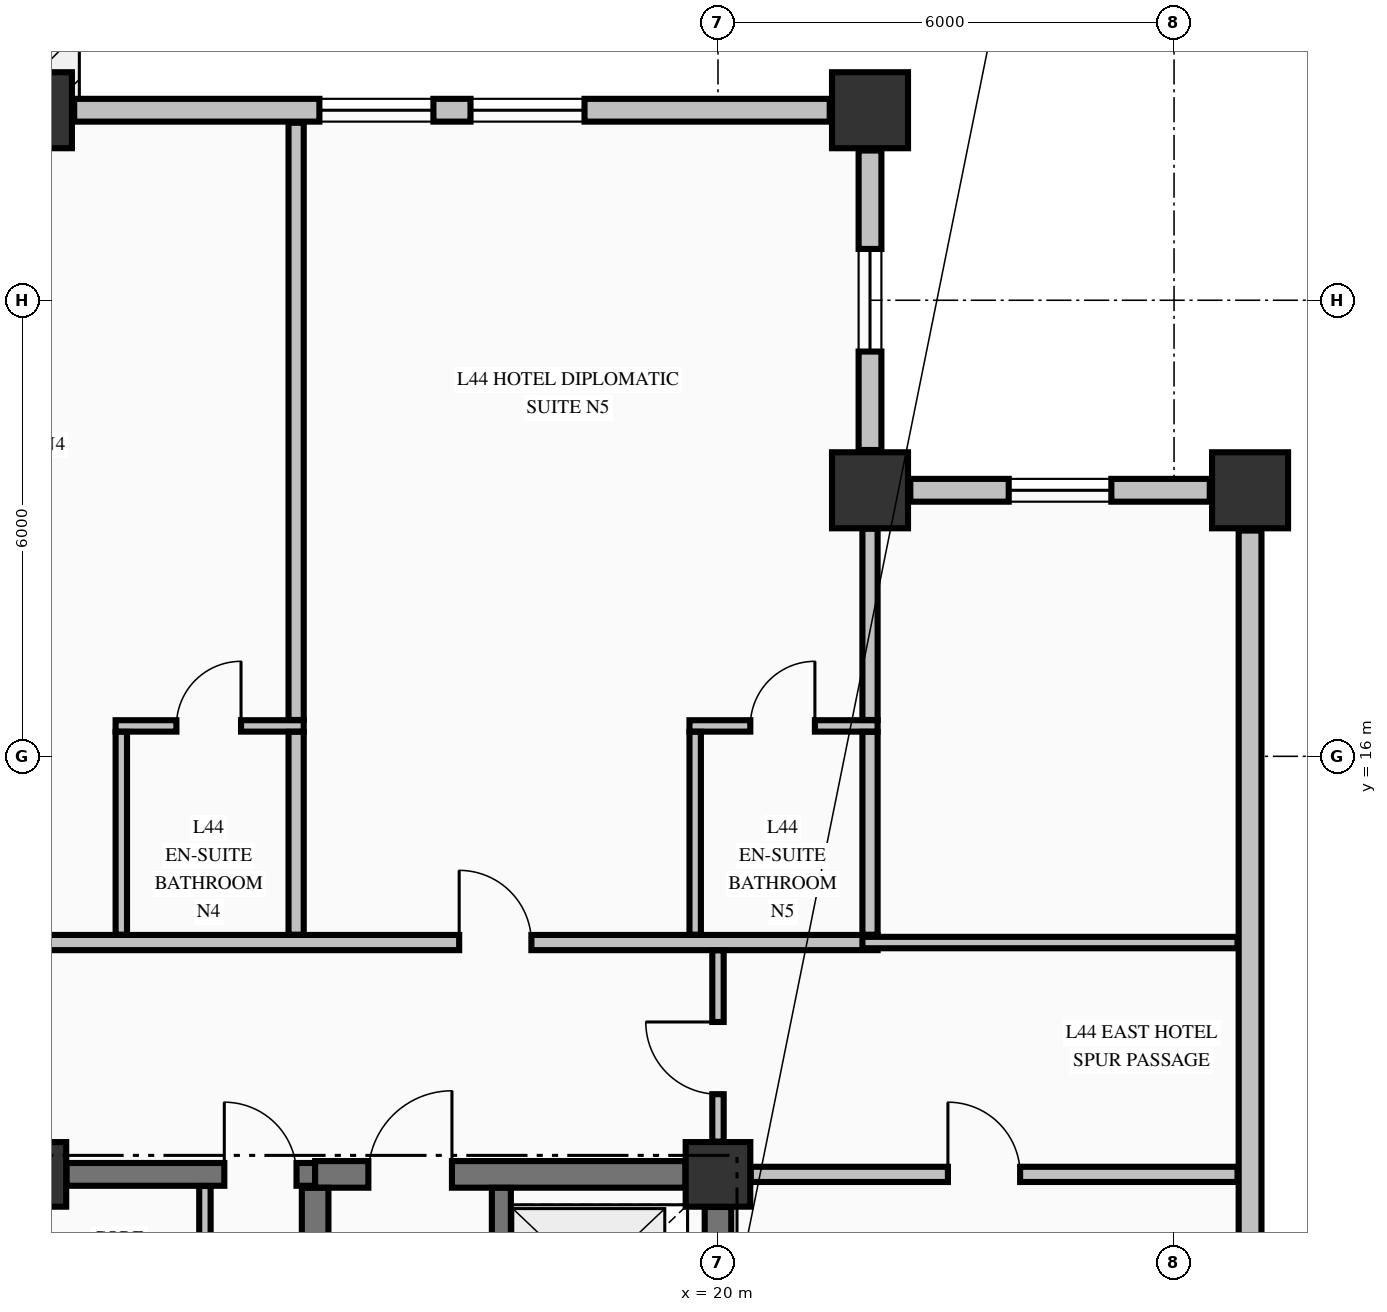
"""IFC4 building model, lengths in metres.
Left out: names, types, materials, properties, quantities, classifications, styles, units other than length and angle.
Written with IfcOpenShell. Run it as: python <this file> out.ifc"""

import sys

from ifc_helpers import new_model, si_unit, direction, frame, frame_2d, origin, origin_2d, place, context, subcontext, project, spatial, rectangle, extrude, element, fill, save


model = new_model("IFC4")
c1 = context("Model", 3, precision=1e-05, world=origin(), true_north=direction((0.0, 1.0)))
c2 = subcontext(c1, "Body", "Model", "MODEL_VIEW")
j1 = project(units=[si_unit("LENGTHUNIT", "METRE"), si_unit("PLANEANGLEUNIT", "RADIAN")], contexts=[c1])
p1 = place(None, origin())
s1 = spatial("IfcSite", under=j1, at=p1, CompositionType="ELEMENT")
p2 = place(p1, origin())
s2 = spatial("IfcBuilding", under=s1, at=p2, CompositionType="ELEMENT")
p3 = place(p2, frame((0.0, 0.0, 172.86)))
s3 = spatial("IfcBuildingStorey", under=s2, at=p3, CompositionType="ELEMENT", Elevation=172.86)
for number, where, z_axis, x_axis in (
    (1, (11.0, 24.5, -0.25), (0.0, 0.0, 1.0), (1.0, 0.0, 0.0)),
    (2, (22.0, 24.5, -0.25), (0.0, 0.0, 1.0), (1.0, 0.0, 0.0)),
    (3, (27.0, 19.5, -0.25), (0.0, 0.0, 1.0), (1.0, 0.0, 0.0)),
    (4, (22.0, 19.5, -0.25), (0.0, 0.0, 1.0), (1.0, 0.0, 0.0)),
):
    element("IfcColumn", number, at=place(p3, frame(where, z_axis=z_axis, x_axis=x_axis)), inside=s3, PredefinedType="COLUMN", context=c2, shape_type="SweptSolid", body=[
        extrude(rectangle(XDim=1.0, YDim=1.0, at=origin_2d()), origin(), (0.0, 0.0, 1.0), 3.375),
    ])
for number, where, z_axis, x_axis in (
    (5, (11.0, 10.5, -0.25), (0.0, 0.0, 1.0), (1.0, 0.0, 0.0)),
    (6, (20.0, 10.5, -0.25), (0.0, 0.0, 1.0), (1.0, 0.0, 0.0)),
):
    element("IfcColumn", number, at=place(p3, frame(where, z_axis=z_axis, x_axis=x_axis)), inside=s3, PredefinedType="COLUMN", context=c2, shape_type="SweptSolid", body=[
        extrude(rectangle(XDim=0.85, YDim=0.85, at=origin_2d()), origin(), (0.0, 0.0, 1.0), 3.375),
    ])
p4 = place(p3, frame((26.47, 19.5, 0.0), z_axis=(0.0, 0.0, 1.0), x_axis=(-1.0, 0.0, 0.0)))
e7 = element("IfcWall", 7, at=p4, inside=s3, PredefinedType="STANDARD", context=c2, shape_type="SweptSolid", body=[
    extrude(rectangle(XDim=3.94, YDim=0.3, at=frame_2d((1.97, 0.0))), origin(), (0.0, 0.0, 1.0), 2.517),
])
p5 = place(p4, frame((1.295, 0.0, 0.68)))
e8 = element("IfcOpeningElement", 8, at=p5, cuts=e7, PredefinedType="OPENING", context=c2, shape_type="SweptSolid", body=[
    extrude(rectangle(XDim=1.35, YDim=1.42, at=frame_2d((0.675, 0.71))), frame((0.0, 0.16, 0.0), z_axis=(0.0, -1.0, 0.0), x_axis=(1.0, 0.0, 0.0)), (0.0, 0.0, 1.0), 0.32),
])
p6 = place(p3, frame((22.0, 20.03, 0.0), z_axis=(0.0, 0.0, 1.0), x_axis=(0.0, 1.0, 0.0)))
e9 = element("IfcWall", 9, at=p6, inside=s3, PredefinedType="STANDARD", context=c2, shape_type="SweptSolid", body=[
    extrude(rectangle(XDim=3.94, YDim=0.3, at=frame_2d((1.97, 0.0))), origin(), (0.0, 0.0, 1.0), 2.517),
])
p7 = place(p6, frame((1.295, 0.0, 0.68)))
e10 = element("IfcOpeningElement", 10, at=p7, cuts=e9, PredefinedType="OPENING", context=c2, shape_type="SweptSolid", body=[
    extrude(rectangle(XDim=1.35, YDim=1.42, at=frame_2d((0.675, 0.71))), frame((0.0, 0.16, 0.0), z_axis=(0.0, -1.0, 0.0), x_axis=(1.0, 0.0, 0.0)), (0.0, 0.0, 1.0), 0.32),
])
p8 = place(p3, frame((21.47, 24.5, 0.0), z_axis=(0.0, 0.0, 1.0), x_axis=(-1.0, 0.0, 0.0)))
e11 = element("IfcWall", 11, at=p8, inside=s3, PredefinedType="STANDARD", context=c2, shape_type="SweptSolid", body=[
    extrude(rectangle(XDim=9.94, YDim=0.3, at=frame_2d((4.97, 0.0))), origin(), (0.0, 0.0, 1.0), 2.517),
])
p9 = place(p8, frame((3.226, 0.0, 0.72)))
e12 = element("IfcOpeningElement", 12, at=p9, cuts=e11, PredefinedType="OPENING", context=c2, shape_type="SweptSolid", body=[
    extrude(rectangle(XDim=1.5, YDim=1.6, at=frame_2d((0.75, 0.8))), frame((0.0, 0.16, 0.0), z_axis=(0.0, -1.0, 0.0), x_axis=(1.0, 0.0, 0.0)), (0.0, 0.0, 1.0), 0.32),
])
p10 = place(p8, frame((5.214, 0.0, 0.72)))
e13 = element("IfcOpeningElement", 13, at=p10, cuts=e11, PredefinedType="OPENING", context=c2, shape_type="SweptSolid", body=[
    extrude(rectangle(XDim=1.5, YDim=1.6, at=frame_2d((0.75, 0.8))), frame((0.0, 0.16, 0.0), z_axis=(0.0, -1.0, 0.0), x_axis=(1.0, 0.0, 0.0)), (0.0, 0.0, 1.0), 0.32),
])
p11 = place(p3, frame((27.0, 9.53, 0.0), z_axis=(0.0, 0.0, 1.0), x_axis=(0.0, 1.0, 0.0)))
e14 = element("IfcWall", 14, at=p11, inside=s3, PredefinedType="STANDARD", context=c2, shape_type="SweptSolid", body=[
    extrude(rectangle(XDim=9.44, YDim=0.3, at=frame_2d((4.72, 0.0))), origin(), (0.0, 0.0, 1.0), 2.517),
])
p12 = place(p3, frame((11.429, 10.5, 0.0), z_axis=(0.0, 0.0, 1.0), x_axis=(1.0, 0.0, 0.0)))
e15 = element("IfcWall", 15, at=p12, inside=s3, PredefinedType="SHEAR", context=c2, shape_type="SweptSolid", body=[
    extrude(rectangle(XDim=3.271, YDim=0.3, at=frame_2d((1.635, 0.0))), origin(), (0.0, 0.0, 1.0), 3.125),
])
p13 = place(p12, frame((2.076, 0.0, 0.0)))
e16 = element("IfcOpeningElement", 16, at=p13, cuts=e15, PredefinedType="OPENING", context=c2, shape_type="SweptSolid", body=[
    extrude(rectangle(XDim=0.95, YDim=2.15, at=frame_2d((0.475, 1.075))), frame((0.0, 0.16, 0.0), z_axis=(0.0, -1.0, 0.0), x_axis=(1.0, 0.0, 0.0)), (0.0, 0.0, 1.0), 0.32),
])
p14 = place(p3, frame((14.7, 10.5, 0.0), z_axis=(0.0, 0.0, 1.0), x_axis=(1.0, 0.0, 0.0)))
e17 = element("IfcWall", 17, at=p14, inside=s3, PredefinedType="SHEAR", context=c2, shape_type="SweptSolid", body=[
    extrude(rectangle(XDim=4.871, YDim=0.35, at=frame_2d((2.436, 0.0))), origin(), (0.0, 0.0, 1.0), 3.125),
])
p15 = place(p14, frame((0.7, 0.0, 0.0)))
e18 = element("IfcOpeningElement", 18, at=p15, cuts=e17, PredefinedType="OPENING", context=c2, shape_type="SweptSolid", body=[
    extrude(rectangle(XDim=1.1, YDim=2.15, at=frame_2d((0.55, 1.075))), frame((0.0, 0.185, 0.0), z_axis=(0.0, -1.0, 0.0), x_axis=(1.0, 0.0, 0.0)), (0.0, 0.0, 1.0), 0.37),
])
p16 = place(p3, frame((20.431, 10.5, 0.0), z_axis=(0.0, 0.0, 1.0), x_axis=(1.0, 0.0, 0.0)))
e19 = element("IfcWall", 19, at=p16, inside=s3, PredefinedType="PARTITIONING", context=c2, shape_type="SweptSolid", body=[
    extrude(rectangle(XDim=6.404, YDim=0.2, at=frame_2d((3.202, 0.0))), origin(), (0.0, 0.0, 1.0), 3.125),
])
p17 = place(p16, frame((2.594, 0.0, 0.0)))
e20 = element("IfcOpeningElement", 20, at=p17, cuts=e19, PredefinedType="OPENING", context=c2, shape_type="SweptSolid", body=[
    extrude(rectangle(XDim=0.95, YDim=2.15, at=frame_2d((0.475, 1.075))), frame((0.0, 0.11, 0.0), z_axis=(0.0, -1.0, 0.0), x_axis=(1.0, 0.0, 0.0)), (0.0, 0.0, 1.0), 0.22),
])
p18 = place(p3, frame((-17.1, 13.55, 0.0), z_axis=(0.0, 0.0, 1.0), x_axis=(1.0, 0.0, 0.0)))
e21 = element("IfcWall", 21, at=p18, inside=s3, PredefinedType="PARTITIONING", context=c2, shape_type="SweptSolid", body=[
    extrude(rectangle(XDim=39.2, YDim=0.2, at=frame_2d((19.6, 0.0))), origin(), (0.0, 0.0, 1.0), 3.125),
])
p19 = place(p18, frame((3.695, 0.0, 0.0)))
e22 = element("IfcOpeningElement", 22, at=p19, cuts=e21, PredefinedType="OPENING", context=c2, shape_type="SweptSolid", body=[
    extrude(rectangle(XDim=0.95, YDim=2.15, at=frame_2d((0.475, 1.075))), frame((0.0, 0.11, 0.0), z_axis=(0.0, -1.0, 0.0), x_axis=(1.0, 0.0, 0.0)), (0.0, 0.0, 1.0), 0.22),
])
p20 = place(p18, frame((11.695, 0.0, 0.0)))
e23 = element("IfcOpeningElement", 23, at=p20, cuts=e21, PredefinedType="OPENING", context=c2, shape_type="SweptSolid", body=[
    extrude(rectangle(XDim=0.95, YDim=2.15, at=frame_2d((0.475, 1.075))), frame((0.0, 0.11, 0.0), z_axis=(0.0, -1.0, 0.0), x_axis=(1.0, 0.0, 0.0)), (0.0, 0.0, 1.0), 0.22),
])
p21 = place(p18, frame((17.125, 0.0, 0.0)))
e24 = element("IfcOpeningElement", 24, at=p21, cuts=e21, PredefinedType="OPENING", context=c2, shape_type="SweptSolid", body=[
    extrude(rectangle(XDim=0.95, YDim=2.15, at=frame_2d((0.475, 1.075))), frame((0.0, 0.11, 0.0), z_axis=(0.0, -1.0, 0.0), x_axis=(1.0, 0.0, 0.0)), (0.0, 0.0, 1.0), 0.22),
])
p22 = place(p18, frame((25.325, 0.0, 0.0)))
e25 = element("IfcOpeningElement", 25, at=p22, cuts=e21, PredefinedType="OPENING", context=c2, shape_type="SweptSolid", body=[
    extrude(rectangle(XDim=0.95, YDim=2.15, at=frame_2d((0.475, 1.075))), frame((0.0, 0.11, 0.0), z_axis=(0.0, -1.0, 0.0), x_axis=(1.0, 0.0, 0.0)), (0.0, 0.0, 1.0), 0.22),
])
p23 = place(p18, frame((33.695, 0.0, 0.0)))
e26 = element("IfcOpeningElement", 26, at=p23, cuts=e21, PredefinedType="OPENING", context=c2, shape_type="SweptSolid", body=[
    extrude(rectangle(XDim=0.95, YDim=2.15, at=frame_2d((0.475, 1.075))), frame((0.0, 0.11, 0.0), z_axis=(0.0, -1.0, 0.0), x_axis=(1.0, 0.0, 0.0)), (0.0, 0.0, 1.0), 0.22),
])
p24 = place(p3, frame((21.9, 13.55, 0.0), z_axis=(0.0, 0.0, 1.0), x_axis=(1.0, 0.0, 0.0)))
e27 = element("IfcWall", 27, at=p24, inside=s3, PredefinedType="PARTITIONING", context=c2, shape_type="SweptSolid", body=[
    extrude(rectangle(XDim=4.935, YDim=0.15, at=frame_2d((2.468, 0.0))), origin(), (0.0, 0.0, 1.0), 3.125),
])
p25 = place(p3, frame((12.075, 16.4, 0.0), z_axis=(0.0, 0.0, 1.0), x_axis=(1.0, 0.0, 0.0)))
e28 = element("IfcWall", 28, at=p25, inside=s3, PredefinedType="PARTITIONING", context=c2, shape_type="SweptSolid", body=[
    extrude(rectangle(XDim=2.475, YDim=0.15, at=frame_2d((1.238, 0.0))), origin(), (0.0, 0.0, 1.0), 3.125),
])
p26 = place(p25, frame((0.8, 0.0, 0.0)))
e29 = element("IfcOpeningElement", 29, at=p26, cuts=e28, PredefinedType="OPENING", context=c2, shape_type="SweptSolid", body=[
    extrude(rectangle(XDim=0.85, YDim=2.1, at=frame_2d((0.425, 1.05))), frame((0.0, 0.085, 0.0), z_axis=(0.0, -1.0, 0.0), x_axis=(1.0, 0.0, 0.0)), (0.0, 0.0, 1.0), 0.17),
])
p27 = place(p3, frame((19.625, 16.4, 0.0), z_axis=(0.0, 0.0, 1.0), x_axis=(1.0, 0.0, 0.0)))
e30 = element("IfcWall", 30, at=p27, inside=s3, PredefinedType="PARTITIONING", context=c2, shape_type="SweptSolid", body=[
    extrude(rectangle(XDim=2.475, YDim=0.15, at=frame_2d((1.238, 0.0))), origin(), (0.0, 0.0, 1.0), 3.125),
])
p28 = place(p27, frame((0.8, 0.0, 0.0)))
e31 = element("IfcOpeningElement", 31, at=p28, cuts=e30, PredefinedType="OPENING", context=c2, shape_type="SweptSolid", body=[
    extrude(rectangle(XDim=0.85, YDim=2.1, at=frame_2d((0.425, 1.05))), frame((0.0, 0.085, 0.0), z_axis=(0.0, -1.0, 0.0), x_axis=(1.0, 0.0, 0.0)), (0.0, 0.0, 1.0), 0.17),
])
p29 = place(p3, frame((14.7, 5.852, 0.0), z_axis=(0.0, 0.0, 1.0), x_axis=(0.0, 1.0, 0.0)))
e32 = element("IfcWall", 32, at=p29, inside=s3, PredefinedType="SHEAR", context=c2, shape_type="SweptSolid", body=[
    extrude(rectangle(XDim=4.471, YDim=0.35, at=frame_2d((2.235, 0.0))), origin(), (0.0, 0.0, 1.0), 3.125),
])
p30 = place(p3, frame((17.15, 7.877, 0.0), z_axis=(0.0, 0.0, 1.0), x_axis=(0.0, 1.0, 0.0)))
e33 = element("IfcWall", 33, at=p30, inside=s3, PredefinedType="SOLIDWALL", context=c2, shape_type="SweptSolid", body=[
    extrude(rectangle(XDim=2.446, YDim=0.25, at=frame_2d((1.223, 0.0))), origin(), (0.0, 0.0, 1.0), 3.125),
])
p31 = place(p30, frame((0.698, 0.0, 0.0)))
e34 = element("IfcOpeningElement", 34, at=p31, cuts=e33, PredefinedType="OPENING", context=c2, shape_type="SweptSolid", body=[
    extrude(rectangle(XDim=1.1, YDim=2.2, at=frame_2d((0.55, 1.1))), frame((0.0, 0.135, 0.0), z_axis=(0.0, -1.0, 0.0), x_axis=(1.0, 0.0, 0.0)), (0.0, 0.0, 1.0), 0.27),
])
p32 = place(p3, frame((20.0, 7.877, 0.0), z_axis=(0.0, 0.0, 1.0), x_axis=(0.0, 1.0, 0.0)))
e35 = element("IfcWall", 35, at=p32, inside=s3, PredefinedType="SHEAR", context=c2, shape_type="SweptSolid", body=[
    extrude(rectangle(XDim=2.194, YDim=0.35, at=frame_2d((1.097, 0.0))), origin(), (0.0, 0.0, 1.0), 3.125),
])
p33 = place(p3, frame((12.15, 13.653, 0.0), z_axis=(0.0, 0.0, 1.0), x_axis=(0.0, 1.0, 0.0)))
e36 = element("IfcWall", 36, at=p33, inside=s3, PredefinedType="PARTITIONING", context=c2, shape_type="SweptSolid", body=[
    extrude(rectangle(XDim=2.669, YDim=0.15, at=frame_2d((1.334, 0.0))), origin(), (0.0, 0.0, 1.0), 3.125),
])
p34 = place(p3, frame((13.25, 5.853, 0.0), z_axis=(0.0, 0.0, 1.0), x_axis=(0.0, 1.0, 0.0)))
e37 = element("IfcWall", 37, at=p34, inside=s3, PredefinedType="PARTITIONING", context=c2, shape_type="SweptSolid", body=[
    extrude(rectangle(XDim=4.494, YDim=0.15, at=frame_2d((2.247, 0.0))), origin(), (0.0, 0.0, 1.0), 3.125),
])
p35 = place(p34, frame((1.472, 0.0, 0.0)))
e38 = element("IfcOpeningElement", 38, at=p35, cuts=e37, PredefinedType="OPENING", context=c2, shape_type="SweptSolid", body=[
    extrude(rectangle(XDim=0.95, YDim=2.15, at=frame_2d((0.475, 1.075))), frame((0.0, 0.085, 0.0), z_axis=(0.0, -1.0, 0.0), x_axis=(1.0, 0.0, 0.0)), (0.0, 0.0, 1.0), 0.17),
])
p36 = place(p3, frame((14.45, 13.653, 0.0), z_axis=(0.0, 0.0, 1.0), x_axis=(0.0, 1.0, 0.0)))
e39 = element("IfcWall", 39, at=p36, inside=s3, PredefinedType="PARTITIONING", context=c2, shape_type="SweptSolid", body=[
    extrude(rectangle(XDim=2.669, YDim=0.2, at=frame_2d((1.334, 0.0))), origin(), (0.0, 0.0, 1.0), 3.125),
])
p37 = place(p3, frame((14.45, 16.478, 0.0), z_axis=(0.0, 0.0, 1.0), x_axis=(0.0, 1.0, 0.0)))
e40 = element("IfcWall", 40, at=p37, inside=s3, PredefinedType="PARTITIONING", context=c2, shape_type="SweptSolid", body=[
    extrude(rectangle(XDim=7.857, YDim=0.2, at=frame_2d((3.928, 0.0))), origin(), (0.0, 0.0, 1.0), 3.125),
])
p38 = place(p3, frame((19.7, 13.653, 0.0), z_axis=(0.0, 0.0, 1.0), x_axis=(0.0, 1.0, 0.0)))
e41 = element("IfcWall", 41, at=p38, inside=s3, PredefinedType="PARTITIONING", context=c2, shape_type="SweptSolid", body=[
    extrude(rectangle(XDim=2.669, YDim=0.15, at=frame_2d((1.334, 0.0))), origin(), (0.0, 0.0, 1.0), 2.317),
])
p39 = place(p3, frame((20.0, 10.931, 0.0), z_axis=(0.0, 0.0, 1.0), x_axis=(0.0, 1.0, 0.0)))
e42 = element("IfcWall", 42, at=p39, inside=s3, PredefinedType="PARTITIONING", context=c2, shape_type="SweptSolid", body=[
    extrude(rectangle(XDim=2.516, YDim=0.15, at=frame_2d((1.258, 0.0))), origin(), (0.0, 0.0, 1.0), 2.317),
])
p40 = place(p39, frame((0.624, 0.0, 0.0)))
e43 = element("IfcOpeningElement", 43, at=p40, cuts=e42, PredefinedType="OPENING", context=c2, shape_type="SweptSolid", body=[
    extrude(rectangle(XDim=0.95, YDim=2.15, at=frame_2d((0.475, 1.075))), frame((0.0, 0.085, 0.0), z_axis=(0.0, -1.0, 0.0), x_axis=(1.0, 0.0, 0.0)), (0.0, 0.0, 1.0), 0.17),
])
p41 = place(p3, frame((22.0, 13.653, 0.0), z_axis=(0.0, 0.0, 1.0), x_axis=(0.0, 1.0, 0.0)))
e44 = element("IfcWall", 44, at=p41, inside=s3, PredefinedType="PARTITIONING", context=c2, shape_type="SweptSolid", body=[
    extrude(rectangle(XDim=2.669, YDim=0.2, at=frame_2d((1.334, 0.0))), origin(), (0.0, 0.0, 1.0), 3.125),
])
p42 = place(p3, frame((22.0, 16.478, 0.0), z_axis=(0.0, 0.0, 1.0), x_axis=(0.0, 1.0, 0.0)))
e45 = element("IfcWall", 45, at=p42, inside=s3, PredefinedType="PARTITIONING", context=c2, shape_type="SweptSolid", body=[
    extrude(rectangle(XDim=2.516, YDim=0.2, at=frame_2d((1.258, 0.0))), origin(), (0.0, 0.0, 1.0), 3.125),
])
p43 = place(p5, origin())
e46 = element("IfcWindow", 46, at=p43, inside=s3, PartitioningType="SINGLE_PANEL", PredefinedType="WINDOW", context=c2, shape_type="SweptSolid", body=[
    extrude(rectangle(XDim=1.35, YDim=1.42, at=frame_2d((0.675, 0.71))), frame((0.0, 0.03, 0.0), z_axis=(0.0, -1.0, 0.0), x_axis=(1.0, 0.0, 0.0)), (0.0, 0.0, 1.0), 0.06),
])
fill(e8, e46)
p44 = place(p7, origin())
e47 = element("IfcWindow", 47, at=p44, inside=s3, PartitioningType="SINGLE_PANEL", PredefinedType="WINDOW", context=c2, shape_type="SweptSolid", body=[
    extrude(rectangle(XDim=1.35, YDim=1.42, at=frame_2d((0.675, 0.71))), frame((0.0, 0.03, 0.0), z_axis=(0.0, -1.0, 0.0), x_axis=(1.0, 0.0, 0.0)), (0.0, 0.0, 1.0), 0.06),
])
fill(e10, e47)
p45 = place(p9, origin())
e48 = element("IfcWindow", 48, at=p45, inside=s3, PartitioningType="SINGLE_PANEL", PredefinedType="WINDOW", context=c2, shape_type="SweptSolid", body=[
    extrude(rectangle(XDim=1.5, YDim=1.6, at=frame_2d((0.75, 0.8))), frame((0.0, 0.03, 0.0), z_axis=(0.0, -1.0, 0.0), x_axis=(1.0, 0.0, 0.0)), (0.0, 0.0, 1.0), 0.06),
])
fill(e12, e48)
p46 = place(p10, origin())
e49 = element("IfcWindow", 49, at=p46, inside=s3, PartitioningType="SINGLE_PANEL", PredefinedType="WINDOW", context=c2, shape_type="SweptSolid", body=[
    extrude(rectangle(XDim=1.5, YDim=1.6, at=frame_2d((0.75, 0.8))), frame((0.0, 0.03, 0.0), z_axis=(0.0, -1.0, 0.0), x_axis=(1.0, 0.0, 0.0)), (0.0, 0.0, 1.0), 0.06),
])
fill(e13, e49)
p47 = place(p13, origin())
e50 = element("IfcDoor", 50, at=p47, inside=s3, OperationType="SINGLE_SWING_LEFT", PredefinedType="DOOR", context=c2, shape_type="SweptSolid", body=[
    extrude(rectangle(XDim=0.95, YDim=2.15, at=frame_2d((0.475, 1.075))), frame((0.0, 0.025, 0.0), z_axis=(0.0, -1.0, 0.0), x_axis=(1.0, 0.0, 0.0)), (0.0, 0.0, 1.0), 0.05),
])
fill(e16, e50)
p48 = place(p15, origin())
e51 = element("IfcDoor", 51, at=p48, inside=s3, OperationType="SINGLE_SWING_RIGHT", PredefinedType="DOOR", context=c2, shape_type="SweptSolid", body=[
    extrude(rectangle(XDim=1.1, YDim=2.15, at=frame_2d((0.55, 1.075))), frame((0.0, 0.025, 0.0), z_axis=(0.0, -1.0, 0.0), x_axis=(1.0, 0.0, 0.0)), (0.0, 0.0, 1.0), 0.05),
])
fill(e18, e51)
p49 = place(p26, origin())
e52 = element("IfcDoor", 52, at=p49, inside=s3, OperationType="SINGLE_SWING_RIGHT", PredefinedType="DOOR", context=c2, shape_type="SweptSolid", body=[
    extrude(rectangle(XDim=0.85, YDim=2.1, at=frame_2d((0.425, 1.05))), frame((0.0, 0.025, 0.0), z_axis=(0.0, -1.0, 0.0), x_axis=(1.0, 0.0, 0.0)), (0.0, 0.0, 1.0), 0.05),
])
fill(e29, e52)
p50 = place(p23, origin())
e53 = element("IfcDoor", 53, at=p50, inside=s3, OperationType="SINGLE_SWING_LEFT", PredefinedType="DOOR", context=c2, shape_type="SweptSolid", body=[
    extrude(rectangle(XDim=0.95, YDim=2.15, at=frame_2d((0.475, 1.075))), frame((0.0, 0.025, 0.0), z_axis=(0.0, -1.0, 0.0), x_axis=(1.0, 0.0, 0.0)), (0.0, 0.0, 1.0), 0.05),
])
fill(e26, e53)
p51 = place(p28, origin())
e54 = element("IfcDoor", 54, at=p51, inside=s3, OperationType="SINGLE_SWING_RIGHT", PredefinedType="DOOR", context=c2, shape_type="SweptSolid", body=[
    extrude(rectangle(XDim=0.85, YDim=2.1, at=frame_2d((0.425, 1.05))), frame((0.0, 0.025, 0.0), z_axis=(0.0, -1.0, 0.0), x_axis=(1.0, 0.0, 0.0)), (0.0, 0.0, 1.0), 0.05),
])
fill(e31, e54)
p52 = place(p40, origin())
e55 = element("IfcDoor", 55, at=p52, inside=s3, OperationType="SINGLE_SWING_RIGHT", PredefinedType="DOOR", context=c2, shape_type="SweptSolid", body=[
    extrude(rectangle(XDim=0.95, YDim=2.15, at=frame_2d((0.475, 1.075))), frame((0.0, 0.025, 0.0), z_axis=(0.0, -1.0, 0.0), x_axis=(1.0, 0.0, 0.0)), (0.0, 0.0, 1.0), 0.05),
])
fill(e43, e55)
p53 = place(p17, origin())
e56 = element("IfcDoor", 56, at=p53, inside=s3, OperationType="SINGLE_SWING_LEFT", PredefinedType="DOOR", context=c2, shape_type="SweptSolid", body=[
    extrude(rectangle(XDim=0.95, YDim=2.15, at=frame_2d((0.475, 1.075))), frame((0.0, 0.025, 0.0), z_axis=(0.0, -1.0, 0.0), x_axis=(1.0, 0.0, 0.0)), (0.0, 0.0, 1.0), 0.05),
])
fill(e20, e56)
save(model, sys.argv[1])
